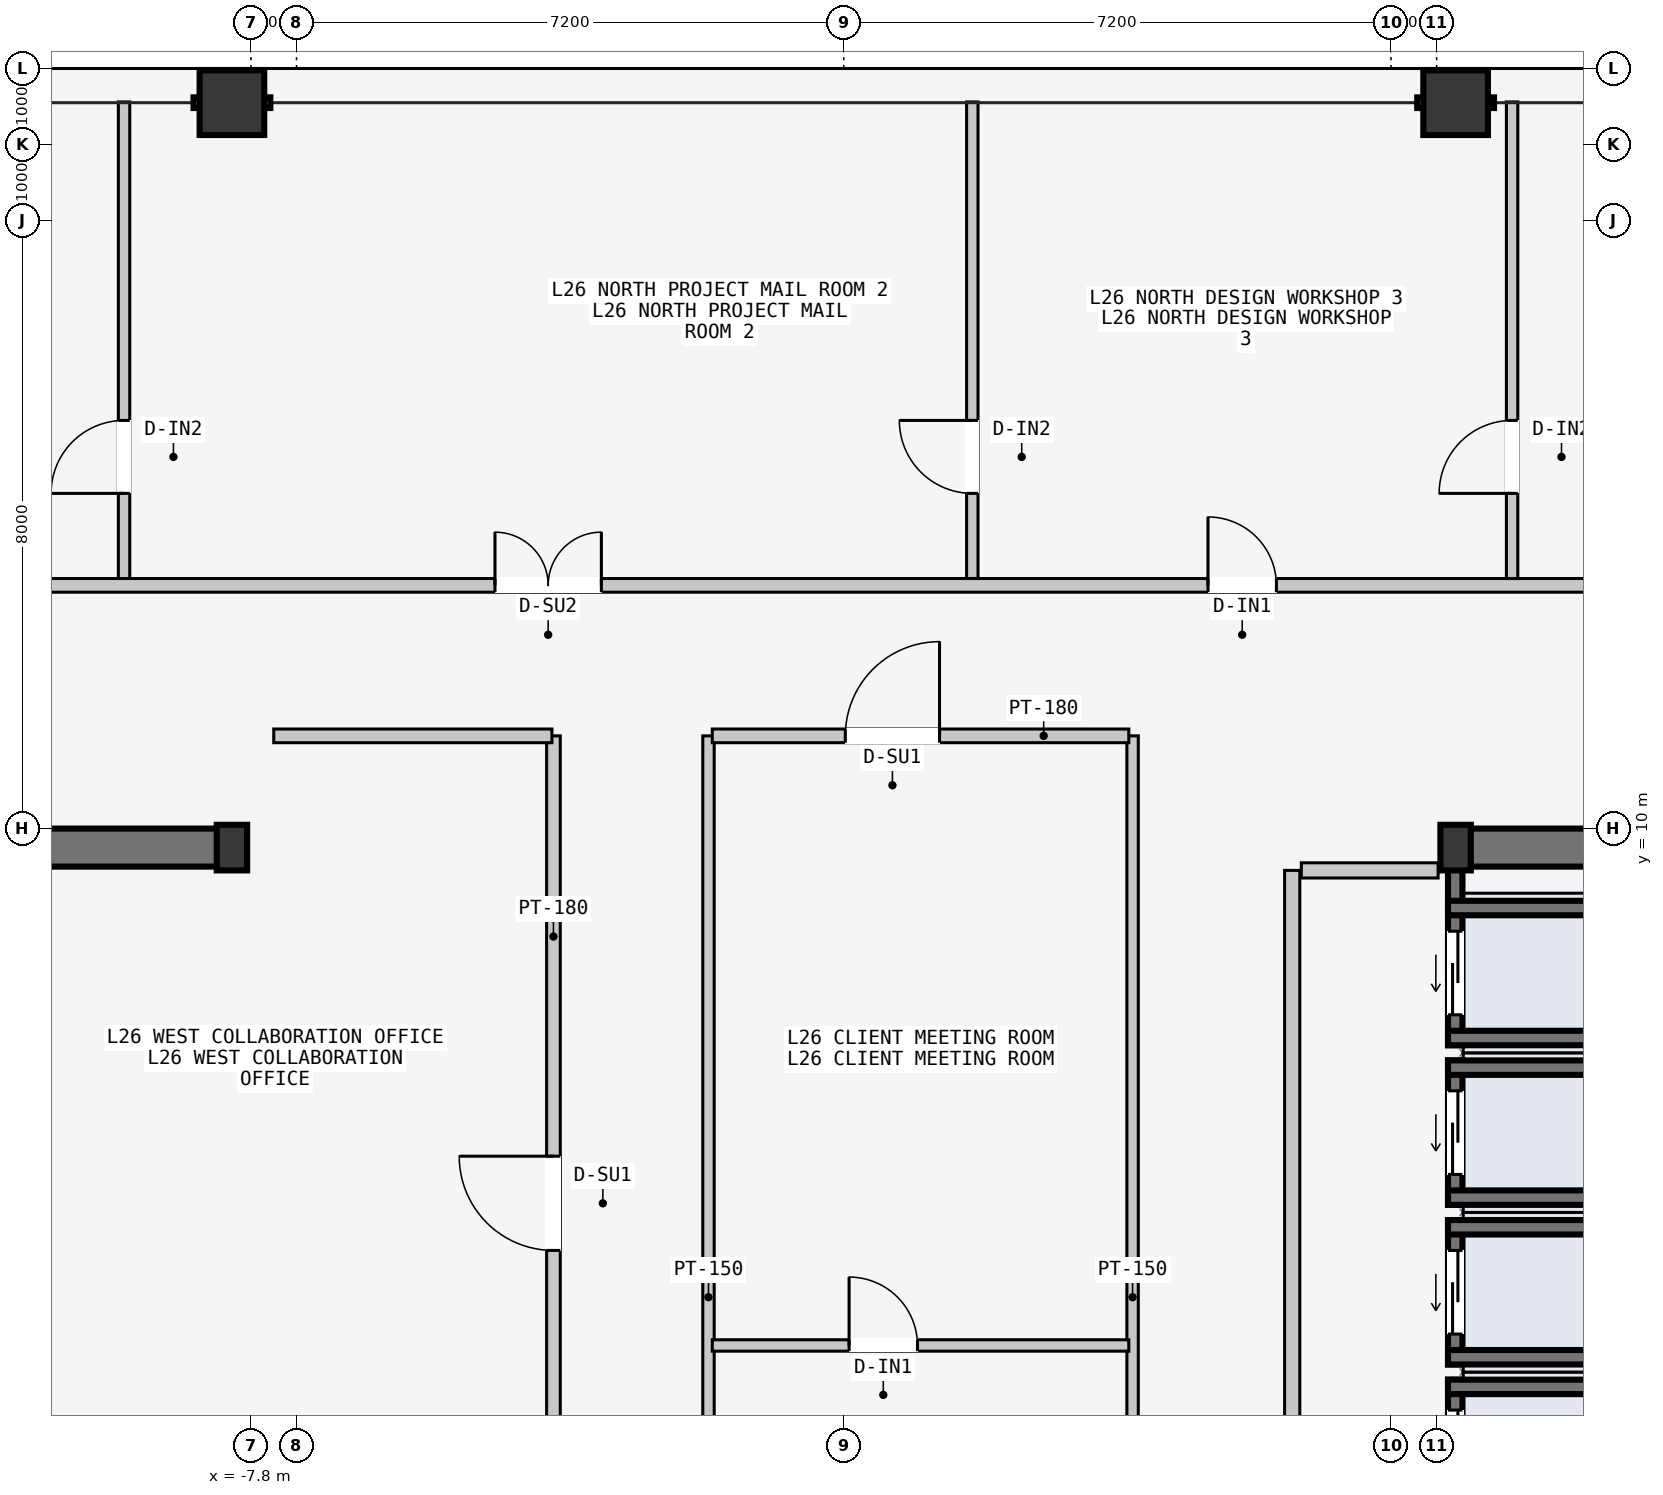
"""IFC4 building model, lengths in metres.
Left out: names, types, materials, properties, quantities, classifications, styles, units other than length and angle.
Written with IfcOpenShell. Run it as: python <this file> out.ifc"""

import sys

from ifc_helpers import new_model, si_unit, direction, frame, frame_2d, origin, origin_2d, place, context, subcontext, project, spatial, rectangle, hollow_rectangle, i_section, extrude, element, fill, save


model = new_model("IFC4")
c1 = context("Model", 3, precision=1e-05, world=origin(), true_north=direction((0.0, 1.0)))
c2 = subcontext(c1, "Body", "Model", "MODEL_VIEW")
j1 = project(units=[si_unit("LENGTHUNIT", "METRE"), si_unit("PLANEANGLEUNIT", "RADIAN")], contexts=[c1])
p1 = place(None, origin())
s1 = spatial("IfcSite", under=j1, at=p1, CompositionType="ELEMENT")
p2 = place(p1, origin())
s2 = spatial("IfcBuilding", under=s1, at=p2, CompositionType="ELEMENT")
p3 = place(p2, frame((0.0, 0.0, 102.6)))
s3 = spatial("IfcBuildingStorey", under=s2, at=p3, CompositionType="ELEMENT", Elevation=102.6)
for number, where, z_axis, x_axis in (
    (1, (-14.53, 9.75, -0.2), (0.0, 0.0, 1.0), (1.0, 0.0, 0.0)),
    (2, (8.07, 9.75, -0.2), (0.0, 0.0, 1.0), (1.0, 0.0, 0.0)),
):
    element("IfcWall", number, at=place(p3, frame(where, z_axis=z_axis, x_axis=x_axis)), inside=s3, PredefinedType="SHEAR", context=c2, shape_type="SweptSolid", body=[
        extrude(rectangle(XDim=6.46, YDim=0.5, at=frame_2d((3.23, 0.0))), origin(), (0.0, 0.0, 1.0), 3.6),
    ])
for number, where, z_axis, x_axis in (
    (3, (-8.05, 9.75, 0.0), (0.0, 0.0, 1.0), (1.0, 0.0, 0.0)),
    (4, (8.05, 9.75, 0.0), (0.0, 0.0, 1.0), (1.0, 0.0, 0.0)),
):
    element("IfcColumn", number, at=place(p3, frame(where, z_axis=z_axis, x_axis=x_axis)), inside=s3, PredefinedType="COLUMN", context=c2, shape_type="SweptSolid", body=[
        extrude(i_section(OverallWidth=0.4, OverallDepth=0.6, WebThickness=0.022, FlangeThickness=0.036, at=origin_2d()), origin(), (0.0, 0.0, 1.0), 3.6),
    ])
for number, where, z_axis, x_axis in (
    (5, (-8.05, 19.55, 0.0), (0.0, 0.0, 1.0), (1.0, 0.0, 0.0)),
    (6, (8.05, 19.55, 0.0), (0.0, 0.0, 1.0), (1.0, 0.0, 0.0)),
):
    element("IfcColumn", number, at=place(p3, frame(where, z_axis=z_axis, x_axis=x_axis)), inside=s3, PredefinedType="COLUMN", context=c2, shape_type="SweptSolid", body=[
        extrude(hollow_rectangle(XDim=0.85, YDim=0.85, WallThickness=0.04, at=origin_2d()), origin(), (0.0, 0.0, 1.0), 3.6),
    ])
p4 = place(p3, frame((8.045, 0.21, -0.2), z_axis=(0.0, 0.0, 1.0), x_axis=(0.0, 1.0, 0.0)))
e7 = element("IfcWall", 7, at=p4, inside=s3, PredefinedType="SOLIDWALL", context=c2, shape_type="SweptSolid", body=[
    extrude(rectangle(XDim=2.54, YDim=0.19, at=frame_2d((1.27, 0.0))), origin(), (0.0, 0.0, 1.0), 3.6),
])
p5 = place(p4, frame((1.04, 0.0, 0.2)))
e8 = element("IfcOpeningElement", 8, at=p5, cuts=e7, PredefinedType="OPENING", context=c2, shape_type="SweptSolid", body=[
    extrude(rectangle(XDim=1.1, YDim=2.2, at=frame_2d((0.55, 1.1))), frame((0.0, 0.105, 0.0), z_axis=(0.0, -1.0, 0.0), x_axis=(1.0, 0.0, 0.0)), (0.0, 0.0, 1.0), 0.21),
])
p6 = place(p3, frame((7.95, 2.655, -0.2), z_axis=(0.0, 0.0, 1.0), x_axis=(1.0, 0.0, 0.0)))
e9 = element("IfcWall", 9, at=p6, inside=s3, PredefinedType="SOLIDWALL", context=c2, shape_type="SweptSolid", body=[
    extrude(rectangle(XDim=2.2, YDim=0.19, at=frame_2d((1.1, 0.0))), origin(), (0.0, 0.0, 1.0), 3.6),
])
p7 = place(p3, frame((8.045, 2.95, -0.2), z_axis=(0.0, 0.0, 1.0), x_axis=(0.0, 1.0, 0.0)))
e10 = element("IfcWall", 10, at=p7, inside=s3, PredefinedType="SOLIDWALL", context=c2, shape_type="SweptSolid", body=[
    extrude(rectangle(XDim=1.9, YDim=0.19, at=frame_2d((0.95, 0.0))), origin(), (0.0, 0.0, 1.0), 3.6),
])
p8 = place(p7, frame((0.4, 0.0, 0.2)))
e11 = element("IfcOpeningElement", 11, at=p8, cuts=e10, PredefinedType="OPENING", context=c2, shape_type="SweptSolid", body=[
    extrude(rectangle(XDim=1.1, YDim=2.2, at=frame_2d((0.55, 1.1))), frame((0.0, 0.105, 0.0), z_axis=(0.0, -1.0, 0.0), x_axis=(1.0, 0.0, 0.0)), (0.0, 0.0, 1.0), 0.21),
])
for number, where, z_axis, x_axis in (
    (12, (7.95, 4.755, -0.2), (0.0, 0.0, 1.0), (1.0, 0.0, 0.0)),
    (13, (7.95, 3.045, -0.2), (0.0, 0.0, 1.0), (1.0, 0.0, 0.0)),
):
    element("IfcWall", number, at=place(p3, frame(where, z_axis=z_axis, x_axis=x_axis)), inside=s3, PredefinedType="SOLIDWALL", context=c2, shape_type="SweptSolid", body=[
        extrude(rectangle(XDim=2.2, YDim=0.19, at=frame_2d((1.1, 0.0))), origin(), (0.0, 0.0, 1.0), 3.6),
    ])
p9 = place(p3, frame((8.045, 5.05, -0.2), z_axis=(0.0, 0.0, 1.0), x_axis=(0.0, 1.0, 0.0)))
e14 = element("IfcWall", 14, at=p9, inside=s3, PredefinedType="SOLIDWALL", context=c2, shape_type="SweptSolid", body=[
    extrude(rectangle(XDim=1.9, YDim=0.19, at=frame_2d((0.95, 0.0))), origin(), (0.0, 0.0, 1.0), 3.6),
])
p10 = place(p9, frame((0.4, 0.0, 0.2)))
e15 = element("IfcOpeningElement", 15, at=p10, cuts=e14, PredefinedType="OPENING", context=c2, shape_type="SweptSolid", body=[
    extrude(rectangle(XDim=1.1, YDim=2.2, at=frame_2d((0.55, 1.1))), frame((0.0, 0.105, 0.0), z_axis=(0.0, -1.0, 0.0), x_axis=(1.0, 0.0, 0.0)), (0.0, 0.0, 1.0), 0.21),
])
for number, where, z_axis, x_axis in (
    (16, (7.95, 6.855, -0.2), (0.0, 0.0, 1.0), (1.0, 0.0, 0.0)),
    (17, (7.95, 5.145, -0.2), (0.0, 0.0, 1.0), (1.0, 0.0, 0.0)),
):
    element("IfcWall", number, at=place(p3, frame(where, z_axis=z_axis, x_axis=x_axis)), inside=s3, PredefinedType="SOLIDWALL", context=c2, shape_type="SweptSolid", body=[
        extrude(rectangle(XDim=2.2, YDim=0.19, at=frame_2d((1.1, 0.0))), origin(), (0.0, 0.0, 1.0), 3.6),
    ])
p11 = place(p3, frame((8.045, 7.15, -0.2), z_axis=(0.0, 0.0, 1.0), x_axis=(0.0, 1.0, 0.0)))
e18 = element("IfcWall", 18, at=p11, inside=s3, PredefinedType="SOLIDWALL", context=c2, shape_type="SweptSolid", body=[
    extrude(rectangle(XDim=2.37, YDim=0.19, at=frame_2d((1.185, 0.0))), origin(), (0.0, 0.0, 1.0), 3.6),
])
p12 = place(p11, frame((0.4, 0.0, 0.2)))
e19 = element("IfcOpeningElement", 19, at=p12, cuts=e18, PredefinedType="OPENING", context=c2, shape_type="SweptSolid", body=[
    extrude(rectangle(XDim=1.1, YDim=2.2, at=frame_2d((0.55, 1.1))), frame((0.0, 0.105, 0.0), z_axis=(0.0, -1.0, 0.0), x_axis=(1.0, 0.0, 0.0)), (0.0, 0.0, 1.0), 0.21),
])
for number, where, z_axis, x_axis in (
    (20, (7.95, 8.955, -0.2), (0.0, 0.0, 1.0), (1.0, 0.0, 0.0)),
    (21, (7.95, 7.245, -0.2), (0.0, 0.0, 1.0), (1.0, 0.0, 0.0)),
):
    element("IfcWall", number, at=place(p3, frame(where, z_axis=z_axis, x_axis=x_axis)), inside=s3, PredefinedType="SOLIDWALL", context=c2, shape_type="SweptSolid", body=[
        extrude(rectangle(XDim=2.2, YDim=0.19, at=frame_2d((1.1, 0.0))), origin(), (0.0, 0.0, 1.0), 3.6),
    ])
p13 = place(p3, frame((5.9, -9.45, 0.0), z_axis=(0.0, 0.0, 1.0), x_axis=(0.0, 1.0, 0.0)))
e22 = element("IfcWall", 22, at=p13, inside=s3, PredefinedType="PARTITIONING", context=c2, shape_type="SweptSolid", body=[
    extrude(rectangle(XDim=18.9, YDim=0.2, at=frame_2d((9.45, 0.0))), origin(), (0.0, 0.0, 1.0), 3.4),
])
p14 = place(p13, frame((3.9, 0.0, 0.0)))
e23 = element("IfcOpeningElement", 23, at=p14, cuts=e22, PredefinedType="OPENING", context=c2, shape_type="SweptSolid", body=[
    extrude(rectangle(XDim=1.5, YDim=2.2, at=frame_2d((0.75, 1.1))), frame((0.0, 0.11, 0.0), z_axis=(0.0, -1.0, 0.0), x_axis=(1.0, 0.0, 0.0)), (0.0, 0.0, 1.0), 0.22),
])
p15 = place(p3, frame((6.02, 9.45, 0.0), z_axis=(0.0, 0.0, 1.0), x_axis=(1.0, 0.0, 0.0)))
e24 = element("IfcWall", 24, at=p15, inside=s3, PredefinedType="PARTITIONING", context=c2, shape_type="SweptSolid", body=[
    extrude(rectangle(XDim=1.8, YDim=0.2, at=frame_2d((0.9, 0.0))), origin(), (0.0, 0.0, 1.0), 3.4),
])
p16 = place(p3, frame((-3.82, 1.05, 0.0), z_axis=(0.0, 0.0, 1.0), x_axis=(0.0, 1.0, 0.0)))
e25 = element("IfcWall", 25, at=p16, inside=s3, PredefinedType="PARTITIONING", context=c2, shape_type="SweptSolid", body=[
    extrude(rectangle(XDim=10.17, YDim=0.18, at=frame_2d((5.085, 0.0))), origin(), (0.0, 0.0, 1.0), 3.4),
])
p17 = place(p16, frame((3.4, 0.0, 0.0)))
e26 = element("IfcOpeningElement", 26, at=p17, cuts=e25, PredefinedType="OPENING", context=c2, shape_type="SweptSolid", body=[
    extrude(rectangle(XDim=1.24, YDim=2.24, at=frame_2d((0.62, 1.12))), frame((0.0, 0.1, 0.0), z_axis=(0.0, -1.0, 0.0), x_axis=(1.0, 0.0, 0.0)), (0.0, 0.0, 1.0), 0.2),
])
p18 = place(p3, frame((-7.5, 11.22, 0.0), z_axis=(0.0, 0.0, 1.0), x_axis=(1.0, 0.0, 0.0)))
e27 = element("IfcWall", 27, at=p18, inside=s3, PredefinedType="PARTITIONING", context=c2, shape_type="SweptSolid", body=[
    extrude(rectangle(XDim=3.66, YDim=0.18, at=frame_2d((1.83, 0.0))), origin(), (0.0, 0.0, 1.0), 3.4),
])
for number, where, z_axis, x_axis in (
    (28, (-1.78, -3.55, 0.0), (0.0, 0.0, 1.0), (0.0, 1.0, 0.0)),
    (29, (3.8, -3.55, 0.0), (0.0, 0.0, 1.0), (0.0, 1.0, 0.0)),
):
    element("IfcWall", number, at=place(p3, frame(where, z_axis=z_axis, x_axis=x_axis)), inside=s3, PredefinedType="PARTITIONING", context=c2, shape_type="SweptSolid", body=[
        extrude(rectangle(XDim=14.77, YDim=0.15, at=frame_2d((7.385, 0.0))), origin(), (0.0, 0.0, 1.0), 3.4),
    ])
p19 = place(p3, frame((-1.73, 3.2, 0.0), z_axis=(0.0, 0.0, 1.0), x_axis=(1.0, 0.0, 0.0)))
e30 = element("IfcWall", 30, at=p19, inside=s3, PredefinedType="PARTITIONING", context=c2, shape_type="SweptSolid", body=[
    extrude(rectangle(XDim=5.48, YDim=0.15, at=frame_2d((2.74, 0.0))), origin(), (0.0, 0.0, 1.0), 3.4),
])
p20 = place(p19, frame((1.8, 0.0, 0.0)))
e31 = element("IfcOpeningElement", 31, at=p20, cuts=e30, PredefinedType="OPENING", context=c2, shape_type="SweptSolid", body=[
    extrude(rectangle(XDim=0.9, YDim=2.15, at=frame_2d((0.45, 1.075))), frame((0.0, 0.085, 0.0), z_axis=(0.0, -1.0, 0.0), x_axis=(1.0, 0.0, 0.0)), (0.0, 0.0, 1.0), 0.17),
])
p21 = place(p3, frame((-1.73, 11.22, 0.0), z_axis=(0.0, 0.0, 1.0), x_axis=(1.0, 0.0, 0.0)))
e32 = element("IfcWall", 32, at=p21, inside=s3, PredefinedType="PARTITIONING", context=c2, shape_type="SweptSolid", body=[
    extrude(rectangle(XDim=5.48, YDim=0.18, at=frame_2d((2.74, 0.0))), origin(), (0.0, 0.0, 1.0), 3.4),
])
p22 = place(p21, frame((1.75, 0.0, 0.0)))
e33 = element("IfcOpeningElement", 33, at=p22, cuts=e32, PredefinedType="OPENING", context=c2, shape_type="SweptSolid", body=[
    extrude(rectangle(XDim=1.24, YDim=2.24, at=frame_2d((0.62, 1.12))), frame((0.0, 0.1, 0.0), z_axis=(0.0, -1.0, 0.0), x_axis=(1.0, 0.0, 0.0)), (0.0, 0.0, 1.0), 0.2),
])
p23 = place(p3, frame((-9.469, 13.26, 0.0), z_axis=(0.0, 0.0, 1.0), x_axis=(0.0, 1.0, 0.0)))
e34 = element("IfcWall", 34, at=p23, inside=s3, PredefinedType="PARTITIONING", context=c2, shape_type="SweptSolid", body=[
    extrude(rectangle(XDim=6.3, YDim=0.15, at=frame_2d((3.15, 0.0))), origin(), (0.0, 0.0, 1.0), 3.4),
])
p24 = place(p23, frame((1.15, 0.0, 0.0)))
e35 = element("IfcOpeningElement", 35, at=p24, cuts=e34, PredefinedType="OPENING", context=c2, shape_type="SweptSolid", body=[
    extrude(rectangle(XDim=0.96, YDim=2.18, at=frame_2d((0.48, 1.09))), frame((0.0, 0.085, 0.0), z_axis=(0.0, -1.0, 0.0), x_axis=(1.0, 0.0, 0.0)), (0.0, 0.0, 1.0), 0.17),
])
p25 = place(p3, frame((1.691, 13.26, 0.0), z_axis=(0.0, 0.0, 1.0), x_axis=(0.0, 1.0, 0.0)))
e36 = element("IfcWall", 36, at=p25, inside=s3, PredefinedType="PARTITIONING", context=c2, shape_type="SweptSolid", body=[
    extrude(rectangle(XDim=6.3, YDim=0.15, at=frame_2d((3.15, 0.0))), origin(), (0.0, 0.0, 1.0), 3.4),
])
p26 = place(p25, frame((1.15, 0.0, 0.0)))
e37 = element("IfcOpeningElement", 37, at=p26, cuts=e36, PredefinedType="OPENING", context=c2, shape_type="SweptSolid", body=[
    extrude(rectangle(XDim=0.96, YDim=2.18, at=frame_2d((0.48, 1.09))), frame((0.0, 0.085, 0.0), z_axis=(0.0, -1.0, 0.0), x_axis=(1.0, 0.0, 0.0)), (0.0, 0.0, 1.0), 0.17),
])
p27 = place(p3, frame((8.793, 13.26, 0.0), z_axis=(0.0, 0.0, 1.0), x_axis=(0.0, 1.0, 0.0)))
e38 = element("IfcWall", 38, at=p27, inside=s3, PredefinedType="PARTITIONING", context=c2, shape_type="SweptSolid", body=[
    extrude(rectangle(XDim=6.3, YDim=0.15, at=frame_2d((3.15, 0.0))), origin(), (0.0, 0.0, 1.0), 3.4),
])
p28 = place(p27, frame((1.15, 0.0, 0.0)))
e39 = element("IfcOpeningElement", 39, at=p28, cuts=e38, PredefinedType="OPENING", context=c2, shape_type="SweptSolid", body=[
    extrude(rectangle(XDim=0.96, YDim=2.18, at=frame_2d((0.48, 1.09))), frame((0.0, 0.085, 0.0), z_axis=(0.0, -1.0, 0.0), x_axis=(1.0, 0.0, 0.0)), (0.0, 0.0, 1.0), 0.17),
])
p29 = place(p3, frame((-16.1, 13.2, 0.0), z_axis=(0.0, 0.0, 1.0), x_axis=(1.0, 0.0, 0.0)))
e40 = element("IfcWall", 40, at=p29, inside=s3, PredefinedType="PARTITIONING", context=c2, shape_type="SweptSolid", body=[
    extrude(rectangle(XDim=32.2, YDim=0.18, at=frame_2d((16.1, 0.0))), origin(), (0.0, 0.0, 1.0), 3.4),
])
p30 = place(p29, frame((2.695, 0.0, 0.0)))
e41 = element("IfcOpeningElement", 41, at=p30, cuts=e40, PredefinedType="OPENING", context=c2, shape_type="SweptSolid", body=[
    extrude(rectangle(XDim=1.24, YDim=2.24, at=frame_2d((0.62, 1.12))), frame((0.0, 0.1, 0.0), z_axis=(0.0, -1.0, 0.0), x_axis=(1.0, 0.0, 0.0)), (0.0, 0.0, 1.0), 0.2),
])
p31 = place(p29, frame((11.511, 0.0, 0.0)))
e42 = element("IfcOpeningElement", 42, at=p31, cuts=e40, PredefinedType="OPENING", context=c2, shape_type="SweptSolid", body=[
    extrude(rectangle(XDim=1.4, YDim=2.2, at=frame_2d((0.7, 1.1))), frame((0.0, 0.1, 0.0), z_axis=(0.0, -1.0, 0.0), x_axis=(1.0, 0.0, 0.0)), (0.0, 0.0, 1.0), 0.2),
])
p32 = place(p29, frame((20.892, 0.0, 0.0)))
e43 = element("IfcOpeningElement", 43, at=p32, cuts=e40, PredefinedType="OPENING", context=c2, shape_type="SweptSolid", body=[
    extrude(rectangle(XDim=0.9, YDim=2.15, at=frame_2d((0.45, 1.075))), frame((0.0, 0.1, 0.0), z_axis=(0.0, -1.0, 0.0), x_axis=(1.0, 0.0, 0.0)), (0.0, 0.0, 1.0), 0.2),
])
p33 = place(p29, frame((28.067, 0.0, 0.0)))
e44 = element("IfcOpeningElement", 44, at=p33, cuts=e40, PredefinedType="OPENING", context=c2, shape_type="SweptSolid", body=[
    extrude(rectangle(XDim=0.96, YDim=2.18, at=frame_2d((0.48, 1.09))), frame((0.0, 0.1, 0.0), z_axis=(0.0, -1.0, 0.0), x_axis=(1.0, 0.0, 0.0)), (0.0, 0.0, 1.0), 0.2),
])
p34 = place(p5, origin())
e45 = element("IfcDoor", 45, at=p34, inside=s3, OperationType="SLIDING_TO_LEFT", PredefinedType="DOOR", context=c2, shape_type="SweptSolid", body=[
    extrude(rectangle(XDim=1.1, YDim=2.2, at=frame_2d((0.55, 1.1))), frame((0.0, 0.025, 0.0), z_axis=(0.0, -1.0, 0.0), x_axis=(1.0, 0.0, 0.0)), (0.0, 0.0, 1.0), 0.05),
])
fill(e8, e45)
p35 = place(p8, origin())
e46 = element("IfcDoor", 46, at=p35, inside=s3, OperationType="SLIDING_TO_LEFT", PredefinedType="DOOR", context=c2, shape_type="SweptSolid", body=[
    extrude(rectangle(XDim=1.1, YDim=2.2, at=frame_2d((0.55, 1.1))), frame((0.0, 0.025, 0.0), z_axis=(0.0, -1.0, 0.0), x_axis=(1.0, 0.0, 0.0)), (0.0, 0.0, 1.0), 0.05),
])
fill(e11, e46)
p36 = place(p10, origin())
e47 = element("IfcDoor", 47, at=p36, inside=s3, OperationType="SLIDING_TO_LEFT", PredefinedType="DOOR", context=c2, shape_type="SweptSolid", body=[
    extrude(rectangle(XDim=1.1, YDim=2.2, at=frame_2d((0.55, 1.1))), frame((0.0, 0.025, 0.0), z_axis=(0.0, -1.0, 0.0), x_axis=(1.0, 0.0, 0.0)), (0.0, 0.0, 1.0), 0.05),
])
fill(e15, e47)
p37 = place(p12, origin())
e48 = element("IfcDoor", 48, at=p37, inside=s3, OperationType="SLIDING_TO_LEFT", PredefinedType="DOOR", context=c2, shape_type="SweptSolid", body=[
    extrude(rectangle(XDim=1.1, YDim=2.2, at=frame_2d((0.55, 1.1))), frame((0.0, 0.025, 0.0), z_axis=(0.0, -1.0, 0.0), x_axis=(1.0, 0.0, 0.0)), (0.0, 0.0, 1.0), 0.05),
])
fill(e19, e48)
p38 = place(p17, origin())
e49 = element("IfcDoor", 49, at=p38, inside=s3, OperationType="SINGLE_SWING_RIGHT", PredefinedType="DOOR", context=c2, shape_type="SweptSolid", body=[
    extrude(rectangle(XDim=1.24, YDim=2.24, at=frame_2d((0.62, 1.12))), frame((0.0, 0.025, 0.0), z_axis=(0.0, -1.0, 0.0), x_axis=(1.0, 0.0, 0.0)), (0.0, 0.0, 1.0), 0.05),
])
fill(e26, e49)
p39 = place(p20, origin())
e50 = element("IfcDoor", 50, at=p39, inside=s3, OperationType="SINGLE_SWING_LEFT", PredefinedType="DOOR", context=c2, shape_type="SweptSolid", body=[
    extrude(rectangle(XDim=0.9, YDim=2.15, at=frame_2d((0.45, 1.075))), frame((0.0, 0.025, 0.0), z_axis=(0.0, -1.0, 0.0), x_axis=(1.0, 0.0, 0.0)), (0.0, 0.0, 1.0), 0.05),
])
fill(e31, e50)
p40 = place(p22, origin())
e51 = element("IfcDoor", 51, at=p40, inside=s3, OperationType="SINGLE_SWING_RIGHT", PredefinedType="DOOR", context=c2, shape_type="SweptSolid", body=[
    extrude(rectangle(XDim=1.24, YDim=2.24, at=frame_2d((0.62, 1.12))), frame((0.0, 0.025, 0.0), z_axis=(0.0, -1.0, 0.0), x_axis=(1.0, 0.0, 0.0)), (0.0, 0.0, 1.0), 0.05),
])
fill(e33, e51)
p41 = place(p24, origin())
e52 = element("IfcDoor", 52, at=p41, inside=s3, OperationType="SINGLE_SWING_LEFT", PredefinedType="DOOR", context=c2, shape_type="SweptSolid", body=[
    extrude(rectangle(XDim=0.96, YDim=2.18, at=frame_2d((0.48, 1.09))), frame((0.0, 0.025, 0.0), z_axis=(0.0, -1.0, 0.0), x_axis=(1.0, 0.0, 0.0)), (0.0, 0.0, 1.0), 0.05),
])
fill(e35, e52)
p42 = place(p26, origin())
e53 = element("IfcDoor", 53, at=p42, inside=s3, OperationType="SINGLE_SWING_RIGHT", PredefinedType="DOOR", context=c2, shape_type="SweptSolid", body=[
    extrude(rectangle(XDim=0.96, YDim=2.18, at=frame_2d((0.48, 1.09))), frame((0.0, 0.025, 0.0), z_axis=(0.0, -1.0, 0.0), x_axis=(1.0, 0.0, 0.0)), (0.0, 0.0, 1.0), 0.05),
])
fill(e37, e53)
p43 = place(p28, origin())
e54 = element("IfcDoor", 54, at=p43, inside=s3, OperationType="SINGLE_SWING_LEFT", PredefinedType="DOOR", context=c2, shape_type="SweptSolid", body=[
    extrude(rectangle(XDim=0.96, YDim=2.18, at=frame_2d((0.48, 1.09))), frame((0.0, 0.025, 0.0), z_axis=(0.0, -1.0, 0.0), x_axis=(1.0, 0.0, 0.0)), (0.0, 0.0, 1.0), 0.05),
])
fill(e39, e54)
p44 = place(p31, origin())
e55 = element("IfcDoor", 55, at=p44, inside=s3, OperationType="DOUBLE_DOOR_SINGLE_SWING", PredefinedType="DOOR", context=c2, shape_type="SweptSolid", body=[
    extrude(rectangle(XDim=1.4, YDim=2.2, at=frame_2d((0.7, 1.1))), frame((0.0, 0.025, 0.0), z_axis=(0.0, -1.0, 0.0), x_axis=(1.0, 0.0, 0.0)), (0.0, 0.0, 1.0), 0.05),
])
fill(e42, e55)
p45 = place(p32, origin())
e56 = element("IfcDoor", 56, at=p45, inside=s3, OperationType="SINGLE_SWING_LEFT", PredefinedType="DOOR", context=c2, shape_type="SweptSolid", body=[
    extrude(rectangle(XDim=0.9, YDim=2.15, at=frame_2d((0.45, 1.075))), frame((0.0, 0.025, 0.0), z_axis=(0.0, -1.0, 0.0), x_axis=(1.0, 0.0, 0.0)), (0.0, 0.0, 1.0), 0.05),
])
fill(e43, e56)
save(model, sys.argv[1])
